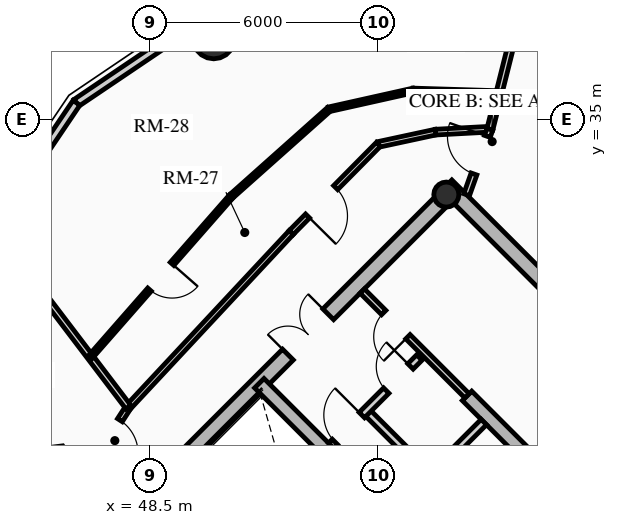
"""IFC4 building model, lengths in metres.
Left out: names, types, materials, properties, quantities, classifications, styles, units other than length and angle.
Written with IfcOpenShell. Run it as: python <this file> out.ifc"""

import sys

from ifc_helpers import new_model, si_unit, direction, frame, frame_2d, origin, origin_2d, place, context, subcontext, project, spatial, rectangle, circle, hollow_circle, extrude, source, transform, mapped, element, fill, save


model = new_model("IFC4")
c1 = context("Model", 3, precision=1e-05, world=origin(), true_north=direction((0.0, 1.0)))
c2 = subcontext(c1, "Body", "Model", "MODEL_VIEW")
j1 = project(units=[si_unit("LENGTHUNIT", "METRE"), si_unit("PLANEANGLEUNIT", "RADIAN")], contexts=[c1])
p1 = place(None, origin())
s1 = spatial("IfcSite", under=j1, at=p1, CompositionType="ELEMENT")
p2 = place(p1, origin())
s2 = spatial("IfcBuilding", under=s1, at=p2, CompositionType="ELEMENT")
p3 = place(p2, frame((0.0, 0.0, 217.03)))
s3 = spatial("IfcBuildingStorey", under=s2, at=p3, CompositionType="ELEMENT", Elevation=217.03)
p4 = place(p3, frame((66.268, 23.298, 0.0), z_axis=(0.0, 0.0, 1.0), x_axis=(-0.707106781187, 0.707106781187, 0.0)))
e1 = element("IfcWall", 1, at=p4, inside=s3, PredefinedType="SHEAR", context=c2, shape_type="SweptSolid", body=[
    extrude(rectangle(XDim=14.1, YDim=0.4, at=frame_2d((7.05, 0.0))), origin(), (0.0, 0.0, 1.0), 2.91),
])
p5 = place(p3, frame((48.873, 25.561, 0.0), z_axis=(0.0, 0.0, 1.0), x_axis=(0.707106781187, 0.707106781187, 0.0)))
e2 = element("IfcWall", 2, at=p5, inside=s3, PredefinedType="SHEAR", context=c2, shape_type="SweptSolid", body=[
    extrude(rectangle(XDim=10.7, YDim=0.4, at=frame_2d((5.35, 0.0))), origin(), (0.0, 0.0, 1.0), 2.91),
])
m1 = source(origin(), c2, "Body", "SweptSolid", [
    extrude(rectangle(XDim=1.5, YDim=2.02, at=frame_2d((0.75, 1.01))), frame((0.0, 0.21, 0.0), z_axis=(0.0, -1.0, 0.0), x_axis=(1.0, 0.0, 0.0)), (0.0, 0.0, 1.0), 0.42),
])
p6 = place(p5, frame((4.6, 0.0, 0.0)))
e3 = element("IfcOpeningElement", 3, at=p6, cuts=e2, PredefinedType="OPENING", context=c2, shape_type="MappedRepresentation", body=[
    mapped(m1, transform((0.0, 0.0, 0.0), x_axis=(1.0, 0.0, 0.0), y_axis=(0.0, 1.0, 0.0), z_axis=(0.0, 0.0, 1.0), scale=1.0)),
])
p7 = place(p3, frame((61.06, 18.373, 0.0), z_axis=(0.0, 0.0, 1.0), x_axis=(-0.707106781187, 0.707106781187, 0.0)))
e4 = element("IfcWall", 4, at=p7, inside=s3, PredefinedType="SHEAR", context=c2, shape_type="SweptSolid", body=[
    extrude(rectangle(XDim=13.7, YDim=0.35, at=frame_2d((6.85, 0.0))), origin(), (0.0, 0.0, 1.0), 2.91),
])
m2 = source(origin(), c2, "Body", "SweptSolid", [
    extrude(rectangle(XDim=1.1, YDim=2.015, at=frame_2d((0.55, 1.007))), frame((0.0, 0.185, 0.0), z_axis=(0.0, -1.0, 0.0), x_axis=(1.0, 0.0, 0.0)), (0.0, 0.0, 1.0), 0.37),
])
p8 = place(p7, frame((4.85, 0.0, 0.0)))
e5 = element("IfcOpeningElement", 5, at=p8, cuts=e4, PredefinedType="OPENING", context=c2, shape_type="MappedRepresentation", body=[
    mapped(m2, transform((0.0, 0.0, 0.0), x_axis=(1.0, 0.0, 0.0), y_axis=(0.0, 1.0, 0.0), z_axis=(0.0, 0.0, 1.0), scale=1.0)),
])
p9 = place(p7, frame((0.625, 0.0, 0.0)))
e6 = element("IfcOpeningElement", 6, at=p9, cuts=e4, PredefinedType="OPENING", context=c2, shape_type="MappedRepresentation", body=[
    mapped(m2, transform((0.0, 0.0, 0.0), x_axis=(1.0, 0.0, 0.0), y_axis=(0.0, 1.0, 0.0), z_axis=(0.0, 0.0, 1.0), scale=1.0)),
])
p10 = place(p7, frame((2.625, 0.0, 0.0)))
e7 = element("IfcOpeningElement", 7, at=p10, cuts=e4, PredefinedType="OPENING", context=c2, shape_type="MappedRepresentation", body=[
    mapped(m2, transform((0.0, 0.0, 0.0), x_axis=(1.0, 0.0, 0.0), y_axis=(0.0, 1.0, 0.0), z_axis=(0.0, 0.0, 1.0), scale=1.0)),
])
m3 = source(origin(), c2, "Body", "SweptSolid", [
    extrude(rectangle(XDim=1.15, YDim=2.02, at=frame_2d((0.575, 1.01))), frame((0.0, 0.185, 0.0), z_axis=(0.0, -1.0, 0.0), x_axis=(1.0, 0.0, 0.0)), (0.0, 0.0, 1.0), 0.37),
])
p11 = place(p7, frame((7.27, 0.0, 0.0)))
e8 = element("IfcOpeningElement", 8, at=p11, cuts=e4, PredefinedType="OPENING", context=c2, shape_type="MappedRepresentation", body=[
    mapped(m3, transform((0.0, 0.0, 0.0), x_axis=(1.0, 0.0, 0.0), y_axis=(0.0, 1.0, 0.0), z_axis=(0.0, 0.0, 1.0), scale=1.0)),
])
p12 = place(p3, frame((63.627, 20.94, 0.0), z_axis=(0.0, 0.0, 1.0), x_axis=(-0.707119496762, 0.707094065383, 0.0)))
e9 = element("IfcWall", 9, at=p12, inside=s3, PredefinedType="SHEAR", context=c2, shape_type="SweptSolid", body=[
    extrude(rectangle(XDim=9.6, YDim=0.35, at=frame_2d((4.8, 0.0))), origin(), (0.0, 0.0, 1.0), 2.91),
])
p13 = place(p12, frame((5.28, 0.0, 0.0)))
e10 = element("IfcOpeningElement", 10, at=p13, cuts=e9, PredefinedType="OPENING", context=c2, shape_type="MappedRepresentation", body=[
    mapped(m3, transform((0.0, 0.0, 0.0), x_axis=(1.0, 0.0, 0.0), y_axis=(0.0, 1.0, 0.0), z_axis=(0.0, 0.0, 1.0), scale=1.0)),
])
p14 = place(p3, frame((56.294, 33.024, 0.0), z_axis=(0.0, 0.0, 1.0), x_axis=(0.707106781187, 0.707106781187, 0.0)))
e11 = element("IfcColumn", 11, at=p14, inside=s3, PredefinedType="COLUMN", context=c2, shape_type="SweptSolid", body=[
    extrude(hollow_circle(Radius=0.33, WallThickness=0.025, at=origin_2d()), origin(), (0.0, 0.0, 1.0), 2.91),
])
p15 = place(p3, frame((50.173, 37.146, 0.0), z_axis=(0.0, 0.0, 1.0), x_axis=(1.0, 0.0, 0.0)))
e12 = element("IfcColumn", 12, at=p15, inside=s3, PredefinedType="USERDEFINED", context=c2, shape_type="SweptSolid", body=[
    extrude(circle(Radius=0.55, at=origin_2d()), origin(), (0.0, 0.0, 1.0), 2.91),
])
p16 = place(p3, frame((46.561, 35.439, 0.0), z_axis=(0.0, 0.0, 1.0), x_axis=(0.828833723692, 0.559495003079, 0.0)))
e13 = element("IfcWall", 13, at=p16, inside=s3, PredefinedType="SOLIDWALL", context=c2, shape_type="SweptSolid", body=[
    extrude(rectangle(XDim=3.976, YDim=0.22, at=frame_2d((1.988, 0.0))), origin(), (0.0, 0.0, 1.0), 2.322),
])
p17 = place(p3, frame((44.337, 32.144, 0.0), z_axis=(0.0, 0.0, 1.0), x_axis=(0.559495003079, 0.828833723692, 0.0)))
e14 = element("IfcWall", 14, at=p17, inside=s3, PredefinedType="SOLIDWALL", context=c2, shape_type="SweptSolid", body=[
    extrude(rectangle(XDim=3.976, YDim=0.22, at=frame_2d((1.988, 0.0))), origin(), (0.0, 0.0, 1.0), 2.322),
])
m4 = source(origin(), c2, "Body", "SweptSolid", [
    extrude(rectangle(XDim=1.05, YDim=1.3, at=frame_2d((0.525, 0.65))), frame((0.0, 0.12, 0.0), z_axis=(0.0, -1.0, 0.0), x_axis=(1.0, 0.0, 0.0)), (0.0, 0.0, 1.0), 0.24),
])
p18 = place(p17, frame((1.463, 0.0, 0.65)))
e15 = element("IfcOpeningElement", 15, at=p18, cuts=e14, PredefinedType="OPENING", context=c2, shape_type="MappedRepresentation", body=[
    mapped(m4, transform((0.0, 0.0, 0.0), x_axis=(1.0, 0.0, 0.0), y_axis=(0.0, 1.0, 0.0), z_axis=(0.0, 0.0, 1.0), scale=1.0)),
])
p19 = place(p3, frame((54.961, 24.719, 0.0), z_axis=(0.0, 0.0, 1.0), x_axis=(0.707106781187, 0.707106781187, 0.0)))
e16 = element("IfcWall", 16, at=p19, inside=s3, PredefinedType="PARTITIONING", context=c2, shape_type="SweptSolid", body=[
    extrude(rectangle(XDim=3.28, YDim=0.2, at=frame_2d((1.64, 0.0))), origin(), (0.0, 0.0, 1.0), 2.685),
])
m5 = source(origin(), c2, "Body", "SweptSolid", [
    extrude(rectangle(XDim=0.9, YDim=2.005, at=frame_2d((0.45, 1.002))), frame((0.0, 0.11, 0.0), z_axis=(0.0, -1.0, 0.0), x_axis=(1.0, 0.0, 0.0)), (0.0, 0.0, 1.0), 0.22),
])
p20 = place(p19, frame((0.16, 0.0, 0.0)))
e17 = element("IfcOpeningElement", 17, at=p20, cuts=e16, PredefinedType="OPENING", context=c2, shape_type="MappedRepresentation", body=[
    mapped(m5, transform((0.0, 0.0, 0.0), x_axis=(1.0, 0.0, 0.0), y_axis=(0.0, 1.0, 0.0), z_axis=(0.0, 0.0, 1.0), scale=1.0)),
])
p21 = place(p3, frame((55.874, 25.631, 0.0), z_axis=(0.0, 0.0, 1.0), x_axis=(-0.707157639372, 0.707055919343, 0.0)))
e18 = element("IfcWall", 18, at=p21, inside=s3, PredefinedType="PARTITIONING", context=c2, shape_type="SweptSolid", body=[
    extrude(rectangle(XDim=2.4, YDim=0.2, at=frame_2d((1.2, 0.0))), origin(), (0.0, 0.0, 1.0), 2.685),
])
p22 = place(p3, frame((53.264, 26.416, 0.0), z_axis=(0.0, 0.0, 1.0), x_axis=(0.707106781187, 0.707106781187, 0.0)))
e19 = element("IfcWall", 19, at=p22, inside=s3, PredefinedType="PARTITIONING", context=c2, shape_type="SweptSolid", body=[
    extrude(rectangle(XDim=3.28, YDim=0.2, at=frame_2d((1.64, 0.0))), origin(), (0.0, 0.0, 1.0), 2.685),
])
m6 = source(origin(), c2, "Body", "SweptSolid", [
    extrude(rectangle(XDim=1.0, YDim=2.015, at=frame_2d((0.5, 1.007))), frame((0.0, 0.11, 0.0), z_axis=(0.0, -1.0, 0.0), x_axis=(1.0, 0.0, 0.0)), (0.0, 0.0, 1.0), 0.22),
])
p23 = place(p22, frame((0.14, 0.0, 0.0)))
e20 = element("IfcOpeningElement", 20, at=p23, cuts=e19, PredefinedType="OPENING", context=c2, shape_type="MappedRepresentation", body=[
    mapped(m6, transform((0.0, 0.0, 0.0), x_axis=(1.0, 0.0, 0.0), y_axis=(0.0, 1.0, 0.0), z_axis=(0.0, 0.0, 1.0), scale=1.0)),
])
p24 = place(p22, frame((2.05, 0.0, 0.0)))
e21 = element("IfcOpeningElement", 21, at=p24, cuts=e19, PredefinedType="OPENING", context=c2, shape_type="MappedRepresentation", body=[
    mapped(m5, transform((0.0, 0.0, 0.0), x_axis=(1.0, 0.0, 0.0), y_axis=(0.0, 1.0, 0.0), z_axis=(0.0, 0.0, 1.0), scale=1.0)),
])
p25 = place(p3, frame((56.839, 27.728, 0.0), z_axis=(0.0, 0.0, 1.0), x_axis=(-0.707106781187, 0.707106781187, 0.0)))
e22 = element("IfcWall", 22, at=p25, inside=s3, PredefinedType="PARTITIONING", context=c2, shape_type="SweptSolid", body=[
    extrude(rectangle(XDim=3.9, YDim=0.16, at=frame_2d((1.95, 0.0))), origin(), (0.0, 0.0, 1.0), 2.685),
])
m7 = source(origin(), c2, "Body", "SweptSolid", [
    extrude(rectangle(XDim=0.9, YDim=2.005, at=frame_2d((0.45, 1.002))), frame((0.0, 0.09, 0.0), z_axis=(0.0, -1.0, 0.0), x_axis=(1.0, 0.0, 0.0)), (0.0, 0.0, 1.0), 0.18),
])
p26 = place(p25, frame((2.2, 0.0, 0.0)))
e23 = element("IfcOpeningElement", 23, at=p26, cuts=e22, PredefinedType="OPENING", context=c2, shape_type="MappedRepresentation", body=[
    mapped(m7, transform((0.0, 0.0, 0.0), x_axis=(1.0, 0.0, 0.0), y_axis=(0.0, 1.0, 0.0), z_axis=(0.0, 0.0, 1.0), scale=1.0)),
])
p27 = place(p3, frame((57.44, 34.744, 0.0), z_axis=(0.0, 0.0, 1.0), x_axis=(-0.998578025565, -0.053309725738, 0.0)))
e24 = element("IfcWall", 24, at=p27, inside=s3, PredefinedType="PARTITIONING", context=c2, shape_type="SweptSolid", body=[
    extrude(rectangle(XDim=1.433, YDim=0.15, at=frame_2d((0.717, 0.0))), origin(), (0.0, 0.0, 1.0), 2.322),
])
p28 = place(p3, frame((56.009, 34.667, 0.0), z_axis=(0.0, 0.0, 1.0), x_axis=(-0.977625498152, -0.210353001795, 0.0)))
e25 = element("IfcWall", 25, at=p28, inside=s3, PredefinedType="PARTITIONING", context=c2, shape_type="SweptSolid", body=[
    extrude(rectangle(XDim=1.538, YDim=0.15, at=frame_2d((0.769, 0.0))), origin(), (0.0, 0.0, 1.0), 2.255),
])
p29 = place(p3, frame((54.506, 34.344, 0.0), z_axis=(0.0, 0.0, 1.0), x_axis=(-0.703053402247, -0.711137056824, 0.0)))
e26 = element("IfcWall", 26, at=p29, inside=s3, PredefinedType="PARTITIONING", context=c2, shape_type="SweptSolid", body=[
    extrude(rectangle(XDim=3.262, YDim=0.15, at=frame_2d((1.631, 0.0))), origin(), (0.0, 0.0, 1.0), 2.322),
])
m8 = source(origin(), c2, "Body", "SweptSolid", [
    extrude(rectangle(XDim=1.05, YDim=2.015, at=frame_2d((0.525, 1.007))), frame((0.0, 0.085, 0.0), z_axis=(0.0, -1.0, 0.0), x_axis=(1.0, 0.0, 0.0)), (0.0, 0.0, 1.0), 0.17),
])
p30 = place(p29, frame((1.599, 0.0, 0.0)))
e27 = element("IfcOpeningElement", 27, at=p30, cuts=e26, PredefinedType="OPENING", context=c2, shape_type="MappedRepresentation", body=[
    mapped(m8, transform((0.0, 0.0, 0.0), x_axis=(1.0, 0.0, 0.0), y_axis=(0.0, 1.0, 0.0), z_axis=(0.0, 0.0, 1.0), scale=1.0)),
])
p31 = place(p3, frame((52.212, 32.024, 0.0), z_axis=(0.0, 0.0, 1.0), x_axis=(-0.682158998173, -0.731203871169, 0.0)))
e28 = element("IfcWall", 28, at=p31, inside=s3, PredefinedType="PARTITIONING", context=c2, shape_type="SweptSolid", body=[
    extrude(rectangle(XDim=6.282, YDim=0.15, at=frame_2d((3.141, 0.0))), origin(), (0.0, 0.0, 1.0), 2.255),
])
p32 = place(p3, frame((47.927, 27.431, 0.0), z_axis=(0.0, 0.0, 1.0), x_axis=(-0.543126643356, -0.839650790077, 0.0)))
e29 = element("IfcWall", 29, at=p32, inside=s3, PredefinedType="PARTITIONING", context=c2, shape_type="SweptSolid", body=[
    extrude(rectangle(XDim=1.868, YDim=0.15, at=frame_2d((0.934, 0.0))), origin(), (0.0, 0.0, 1.0), 2.255),
])
p33 = place(p32, frame((0.409, 0.0, 0.0)))
e30 = element("IfcOpeningElement", 30, at=p33, cuts=e29, PredefinedType="OPENING", context=c2, shape_type="MappedRepresentation", body=[
    mapped(m8, transform((0.0, 0.0, 0.0), x_axis=(1.0, 0.0, 0.0), y_axis=(0.0, 1.0, 0.0), z_axis=(0.0, 0.0, 1.0), scale=1.0)),
])
p34 = place(p3, frame((57.44, 34.744, 0.0), z_axis=(0.0, 0.0, 1.0), x_axis=(0.243619816457, 0.969870808422, 0.0)))
e31 = element("IfcWall", 31, at=p34, inside=s3, PredefinedType="PARTITIONING", context=c2, shape_type="SweptSolid", body=[
    extrude(rectangle(XDim=3.496, YDim=0.16, at=frame_2d((1.748, 0.0))), origin(), (0.0, 0.0, 1.0), 2.322),
])
p35 = place(p3, frame((47.927, 27.431, 0.0), z_axis=(0.0, 0.0, 1.0), x_axis=(-0.604823333103, 0.796359677366, 0.0)))
e32 = element("IfcWall", 32, at=p35, inside=s3, PredefinedType="PARTITIONING", context=c2, shape_type="SweptSolid", body=[
    extrude(rectangle(XDim=5.907, YDim=0.16, at=frame_2d((2.953, 0.0))), origin(), (0.0, 0.0, 1.0), 2.322),
])
p36 = place(p3, frame((56.828, 33.021, 0.0), z_axis=(0.0, 0.0, 1.0), x_axis=(0.334788446034, 0.942293317605, 0.0)))
e33 = element("IfcWall", 33, at=p36, inside=s3, PredefinedType="PARTITIONING", context=c2, shape_type="SweptSolid", body=[
    extrude(rectangle(XDim=1.829, YDim=0.16, at=frame_2d((0.915, 0.0))), origin(), (0.0, 0.0, 1.0), 2.255),
])
m9 = source(origin(), c2, "Body", "SweptSolid", [
    extrude(rectangle(XDim=1.05, YDim=2.015, at=frame_2d((0.525, 1.007))), frame((0.0, 0.09, 0.0), z_axis=(0.0, -1.0, 0.0), x_axis=(1.0, 0.0, 0.0)), (0.0, 0.0, 1.0), 0.18),
])
p37 = place(p36, frame((0.579, 0.0, 0.0)))
e34 = element("IfcOpeningElement", 34, at=p37, cuts=e33, PredefinedType="OPENING", context=c2, shape_type="MappedRepresentation", body=[
    mapped(m9, transform((0.0, 0.0, 0.0), x_axis=(1.0, 0.0, 0.0), y_axis=(0.0, 1.0, 0.0), z_axis=(0.0, 0.0, 1.0), scale=1.0)),
])
p38 = place(p3, frame((57.679, 35.693, 0.0), z_axis=(0.0, 0.0, 1.0), x_axis=(-0.999526298938, 0.030776252722, 0.0)))
e35 = element("IfcWall", 35, at=p38, inside=s3, PredefinedType="PARTITIONING", context=c2, shape_type="SweptSolid", body=[
    extrude(rectangle(XDim=2.261, YDim=0.125, at=frame_2d((1.13, 0.0))), origin(), (0.0, 0.0, 1.0), 2.322),
])
p39 = place(p3, frame((55.419, 35.763, 0.0), z_axis=(0.0, 0.0, 1.0), x_axis=(-0.975917771425, -0.218138725166, 0.0)))
e36 = element("IfcWall", 36, at=p39, inside=s3, PredefinedType="PARTITIONING", context=c2, shape_type="SweptSolid", body=[
    extrude(rectangle(XDim=2.268, YDim=0.125, at=frame_2d((1.134, 0.0))), origin(), (0.0, 0.0, 1.0), 2.255),
])
p40 = place(p3, frame((53.206, 35.268, 0.0), z_axis=(0.0, 0.0, 1.0), x_axis=(-0.746677760999, -0.665185929819, 0.0)))
e37 = element("IfcWall", 37, at=p40, inside=s3, PredefinedType="PARTITIONING", context=c2, shape_type="SweptSolid", body=[
    extrude(rectangle(XDim=3.445, YDim=0.125, at=frame_2d((1.723, 0.0))), origin(), (0.0, 0.0, 1.0), 2.322),
])
p41 = place(p3, frame((50.634, 32.977, 0.0), z_axis=(0.0, 0.0, 1.0), x_axis=(-0.659241945747, -0.751930885765, 0.0)))
e38 = element("IfcWall", 38, at=p41, inside=s3, PredefinedType="PARTITIONING", context=c2, shape_type="SweptSolid", body=[
    extrude(rectangle(XDim=5.624, YDim=0.125, at=frame_2d((2.812, 0.0))), origin(), (0.0, 0.0, 1.0), 2.255),
])
m10 = source(origin(), c2, "Body", "SweptSolid", [
    extrude(rectangle(XDim=0.9, YDim=2.005, at=frame_2d((0.45, 1.002))), frame((0.0, 0.073, 0.0), z_axis=(0.0, -1.0, 0.0), x_axis=(1.0, 0.0, 0.0)), (0.0, 0.0, 1.0), 0.145),
])
p42 = place(p41, frame((2.362, 0.0, 0.0)))
e39 = element("IfcOpeningElement", 39, at=p42, cuts=e38, PredefinedType="OPENING", context=c2, shape_type="MappedRepresentation", body=[
    mapped(m10, transform((0.0, 0.0, 0.0), x_axis=(1.0, 0.0, 0.0), y_axis=(0.0, 1.0, 0.0), z_axis=(0.0, 0.0, 1.0), scale=1.0)),
])
p43 = place(p3, frame((46.844, 25.731, 0.0), z_axis=(0.0, 0.0, 1.0), x_axis=(-0.886802533251, 0.462148533504, 0.0)))
e40 = element("IfcWall", 40, at=p43, inside=s3, PredefinedType="PARTITIONING", context=c2, shape_type="SweptSolid", body=[
    extrude(rectangle(XDim=1.719, YDim=0.125, at=frame_2d((0.859, 0.0))), origin(), (0.0, 0.0, 1.0), 2.685),
])
m11 = source(origin(), c2, "Body", "SweptSolid", [
    extrude(rectangle(XDim=1.5, YDim=2.02, at=frame_2d((0.75, 1.01))), frame((0.0, 0.025, 0.0), z_axis=(0.0, -1.0, 0.0), x_axis=(1.0, 0.0, 0.0)), (0.0, 0.0, 1.0), 0.05),
])
p44 = place(p6, origin())
e41 = element("IfcDoor", 41, at=p44, inside=s3, OperationType="DOUBLE_DOOR_SINGLE_SWING", PredefinedType="DOOR", context=c2, shape_type="MappedRepresentation", body=[
    mapped(m11, transform((0.0, 0.0, 0.0), x_axis=(1.0, 0.0, 0.0), y_axis=(0.0, 1.0, 0.0), z_axis=(0.0, 0.0, 1.0), scale=1.0)),
])
fill(e3, e41)
m12 = source(origin(), c2, "Body", "SweptSolid", [
    extrude(rectangle(XDim=1.0, YDim=2.015, at=frame_2d((0.5, 1.007))), frame((0.0, 0.025, 0.0), z_axis=(0.0, -1.0, 0.0), x_axis=(1.0, 0.0, 0.0)), (0.0, 0.0, 1.0), 0.05),
])
p45 = place(p23, origin())
e42 = element("IfcDoor", 42, at=p45, inside=s3, OperationType="SINGLE_SWING_RIGHT", PredefinedType="DOOR", context=c2, shape_type="MappedRepresentation", body=[
    mapped(m12, transform((0.0, 0.0, 0.0), x_axis=(1.0, 0.0, 0.0), y_axis=(0.0, 1.0, 0.0), z_axis=(0.0, 0.0, 1.0), scale=1.0)),
])
fill(e20, e42)
m13 = source(origin(), c2, "Body", "SweptSolid", [
    extrude(rectangle(XDim=0.9, YDim=2.005, at=frame_2d((0.45, 1.002))), frame((0.0, 0.025, 0.0), z_axis=(0.0, -1.0, 0.0), x_axis=(1.0, 0.0, 0.0)), (0.0, 0.0, 1.0), 0.05),
])
p46 = place(p24, origin())
e43 = element("IfcDoor", 43, at=p46, inside=s3, OperationType="SINGLE_SWING_RIGHT", PredefinedType="DOOR", context=c2, shape_type="MappedRepresentation", body=[
    mapped(m13, transform((0.0, 0.0, 0.0), x_axis=(1.0, 0.0, 0.0), y_axis=(0.0, 1.0, 0.0), z_axis=(0.0, 0.0, 1.0), scale=1.0)),
])
fill(e21, e43)
p47 = place(p26, origin())
e44 = element("IfcDoor", 44, at=p47, inside=s3, OperationType="SINGLE_SWING_LEFT", PredefinedType="DOOR", context=c2, shape_type="MappedRepresentation", body=[
    mapped(m13, transform((0.0, 0.0, 0.0), x_axis=(1.0, 0.0, 0.0), y_axis=(0.0, 1.0, 0.0), z_axis=(0.0, 0.0, 1.0), scale=1.0)),
])
fill(e23, e44)
m14 = source(origin(), c2, "Body", "SweptSolid", [
    extrude(rectangle(XDim=1.05, YDim=2.015, at=frame_2d((0.525, 1.007))), frame((0.0, 0.025, 0.0), z_axis=(0.0, -1.0, 0.0), x_axis=(1.0, 0.0, 0.0)), (0.0, 0.0, 1.0), 0.05),
])
p48 = place(p37, origin())
e45 = element("IfcDoor", 45, at=p48, inside=s3, OperationType="SINGLE_SWING_RIGHT", PredefinedType="DOOR", context=c2, shape_type="MappedRepresentation", body=[
    mapped(m14, transform((0.0, 0.0, 0.0), x_axis=(1.0, 0.0, 0.0), y_axis=(0.0, 1.0, 0.0), z_axis=(0.0, 0.0, 1.0), scale=1.0)),
])
fill(e34, e45)
p49 = place(p30, origin())
e46 = element("IfcDoor", 46, at=p49, inside=s3, OperationType="SINGLE_SWING_RIGHT", PredefinedType="DOOR", context=c2, shape_type="MappedRepresentation", body=[
    mapped(m14, transform((0.0, 0.0, 0.0), x_axis=(1.0, 0.0, 0.0), y_axis=(0.0, 1.0, 0.0), z_axis=(0.0, 0.0, 1.0), scale=1.0)),
])
fill(e27, e46)
p50 = place(p42, origin())
e47 = element("IfcDoor", 47, at=p50, inside=s3, OperationType="SINGLE_SWING_LEFT", PredefinedType="DOOR", context=c2, shape_type="MappedRepresentation", body=[
    mapped(m13, transform((0.0, 0.0, 0.0), x_axis=(1.0, 0.0, 0.0), y_axis=(0.0, 1.0, 0.0), z_axis=(0.0, 0.0, 1.0), scale=1.0)),
])
fill(e39, e47)
p51 = place(p33, origin())
e48 = element("IfcDoor", 48, at=p51, inside=s3, OperationType="SINGLE_SWING_RIGHT", PredefinedType="DOOR", context=c2, shape_type="MappedRepresentation", body=[
    mapped(m14, transform((0.0, 0.0, 0.0), x_axis=(1.0, 0.0, 0.0), y_axis=(0.0, 1.0, 0.0), z_axis=(0.0, 0.0, 1.0), scale=1.0)),
])
fill(e30, e48)
save(model, sys.argv[1])
